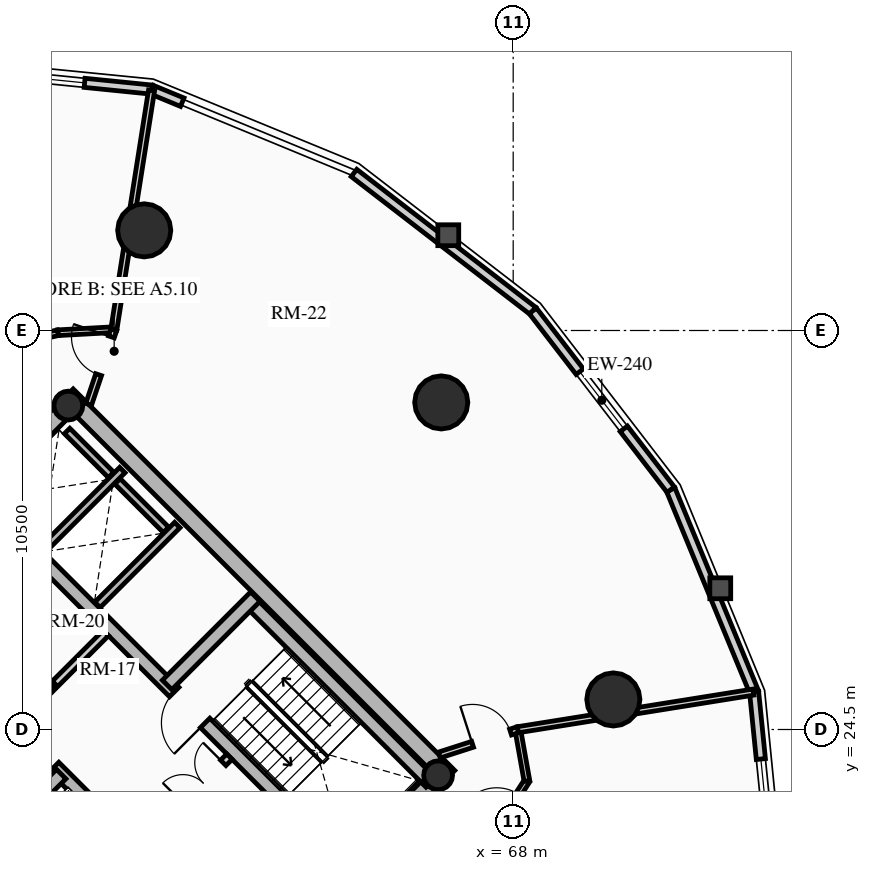
"""IFC4 building model, lengths in metres.
Left out: names, types, materials, properties, quantities, classifications, styles, units other than length and angle.
Written with IfcOpenShell. Run it as: python <this file> out.ifc"""

import sys

from ifc_helpers import new_model, si_unit, direction, frame, frame_2d, origin, origin_2d, place, context, subcontext, project, spatial, rectangle, circle, hollow_circle, extrude, source, transform, mapped, element, fill, save


model = new_model("IFC4")
c1 = context("Model", 3, precision=1e-05, world=origin(), true_north=direction((0.0, 1.0)))
c2 = subcontext(c1, "Body", "Model", "MODEL_VIEW")
j1 = project(units=[si_unit("LENGTHUNIT", "METRE"), si_unit("PLANEANGLEUNIT", "RADIAN")], contexts=[c1])
p1 = place(None, origin())
s1 = spatial("IfcSite", under=j1, at=p1, CompositionType="ELEMENT")
p2 = place(p1, origin())
s2 = spatial("IfcBuilding", under=s1, at=p2, CompositionType="ELEMENT")
p3 = place(p2, frame((0.0, 0.0, 132.88)))
s3 = spatial("IfcBuildingStorey", under=s2, at=p3, CompositionType="ELEMENT", Elevation=132.88)
for number, where, z_axis, x_axis in (
    (1, (58.737, 15.697, 0.0), (0.0, 0.0, 1.0), (-0.707, 0.707, 0.0)),
    (2, (66.303, 23.263, 0.0), (0.0, 0.0, 1.0), (-0.707, 0.707, 0.0)),
):
    element("IfcWall", number, at=place(p3, frame(where, z_axis=z_axis, x_axis=x_axis)), inside=s3, PredefinedType="SHEAR", context=c2, shape_type="SweptSolid", body=[
        extrude(rectangle(XDim=14.2, YDim=0.45, at=frame_2d((7.1, 0.0))), origin(), (0.0, 0.0, 1.0), 3.72),
    ])
p4 = place(p3, frame((58.578, 15.856, 0.0), z_axis=(0.0, 0.0, 1.0), x_axis=(0.707106781187, 0.707106781187, 0.0)))
e3 = element("IfcWall", 3, at=p4, inside=s3, PredefinedType="SHEAR", context=c2, shape_type="SweptSolid", body=[
    extrude(rectangle(XDim=10.7, YDim=0.45, at=frame_2d((5.35, 0.0))), origin(), (0.0, 0.0, 1.0), 3.72),
])
m1 = source(origin(), c2, "Body", "SweptSolid", [
    extrude(rectangle(XDim=1.5, YDim=2.02, at=frame_2d((0.75, 1.01))), frame((0.0, 0.235, 0.0), z_axis=(0.0, -1.0, 0.0), x_axis=(1.0, 0.0, 0.0)), (0.0, 0.0, 1.0), 0.47),
])
p5 = place(p4, frame((5.45, 0.0, 0.0)))
e4 = element("IfcOpeningElement", 4, at=p5, cuts=e3, PredefinedType="OPENING", context=c2, shape_type="MappedRepresentation", body=[
    mapped(m1, transform((0.0, 0.0, 0.0), x_axis=(1.0, 0.0, 0.0), y_axis=(0.0, 1.0, 0.0), z_axis=(0.0, 0.0, 1.0), scale=1.0)),
])
p6 = place(p3, frame((48.856, 25.578, 0.0), z_axis=(0.0, 0.0, 1.0), x_axis=(0.707106781187, 0.707106781187, 0.0)))
e5 = element("IfcWall", 5, at=p6, inside=s3, PredefinedType="SHEAR", context=c2, shape_type="SweptSolid", body=[
    extrude(rectangle(XDim=10.7, YDim=0.45, at=frame_2d((5.35, 0.0))), origin(), (0.0, 0.0, 1.0), 3.72),
])
p7 = place(p6, frame((4.6, 0.0, 0.0)))
e6 = element("IfcOpeningElement", 6, at=p7, cuts=e5, PredefinedType="OPENING", context=c2, shape_type="MappedRepresentation", body=[
    mapped(m1, transform((0.0, 0.0, 0.0), x_axis=(1.0, 0.0, 0.0), y_axis=(0.0, 1.0, 0.0), z_axis=(0.0, 0.0, 1.0), scale=1.0)),
])
p8 = place(p3, frame((61.078, 18.355, 0.0), z_axis=(0.0, 0.0, 1.0), x_axis=(-0.707106781187, 0.707106781187, 0.0)))
e7 = element("IfcWall", 7, at=p8, inside=s3, PredefinedType="SHEAR", context=c2, shape_type="SweptSolid", body=[
    extrude(rectangle(XDim=13.75, YDim=0.35, at=frame_2d((6.875, 0.0))), origin(), (0.0, 0.0, 1.0), 3.72),
])
m2 = source(origin(), c2, "Body", "SweptSolid", [
    extrude(rectangle(XDim=1.1, YDim=2.015, at=frame_2d((0.55, 1.007))), frame((0.0, 0.185, 0.0), z_axis=(0.0, -1.0, 0.0), x_axis=(1.0, 0.0, 0.0)), (0.0, 0.0, 1.0), 0.37),
])
p9 = place(p8, frame((4.875, 0.0, 0.0)))
e8 = element("IfcOpeningElement", 8, at=p9, cuts=e7, PredefinedType="OPENING", context=c2, shape_type="MappedRepresentation", body=[
    mapped(m2, transform((0.0, 0.0, 0.0), x_axis=(1.0, 0.0, 0.0), y_axis=(0.0, 1.0, 0.0), z_axis=(0.0, 0.0, 1.0), scale=1.0)),
])
p10 = place(p8, frame((0.65, 0.0, 0.0)))
e9 = element("IfcOpeningElement", 9, at=p10, cuts=e7, PredefinedType="OPENING", context=c2, shape_type="MappedRepresentation", body=[
    mapped(m2, transform((0.0, 0.0, 0.0), x_axis=(1.0, 0.0, 0.0), y_axis=(0.0, 1.0, 0.0), z_axis=(0.0, 0.0, 1.0), scale=1.0)),
])
p11 = place(p8, frame((2.65, 0.0, 0.0)))
e10 = element("IfcOpeningElement", 10, at=p11, cuts=e7, PredefinedType="OPENING", context=c2, shape_type="MappedRepresentation", body=[
    mapped(m2, transform((0.0, 0.0, 0.0), x_axis=(1.0, 0.0, 0.0), y_axis=(0.0, 1.0, 0.0), z_axis=(0.0, 0.0, 1.0), scale=1.0)),
])
m3 = source(origin(), c2, "Body", "SweptSolid", [
    extrude(rectangle(XDim=1.15, YDim=2.02, at=frame_2d((0.575, 1.01))), frame((0.0, 0.185, 0.0), z_axis=(0.0, -1.0, 0.0), x_axis=(1.0, 0.0, 0.0)), (0.0, 0.0, 1.0), 0.37),
])
p12 = place(p8, frame((7.295, 0.0, 0.0)))
e11 = element("IfcOpeningElement", 11, at=p12, cuts=e7, PredefinedType="OPENING", context=c2, shape_type="MappedRepresentation", body=[
    mapped(m3, transform((0.0, 0.0, 0.0), x_axis=(1.0, 0.0, 0.0), y_axis=(0.0, 1.0, 0.0), z_axis=(0.0, 0.0, 1.0), scale=1.0)),
])
p13 = place(p3, frame((63.645, 20.922, 0.0), z_axis=(0.0, 0.0, 1.0), x_axis=(-0.707106781187, 0.707106781187, 0.0)))
e12 = element("IfcWall", 12, at=p13, inside=s3, PredefinedType="SHEAR", context=c2, shape_type="SweptSolid", body=[
    extrude(rectangle(XDim=13.75, YDim=0.35, at=frame_2d((6.875, 0.0))), origin(), (0.0, 0.0, 1.0), 3.72),
])
p14 = place(p13, frame((5.305, 0.0, 0.0)))
e13 = element("IfcOpeningElement", 13, at=p14, cuts=e12, PredefinedType="OPENING", context=c2, shape_type="MappedRepresentation", body=[
    mapped(m3, transform((0.0, 0.0, 0.0), x_axis=(1.0, 0.0, 0.0), y_axis=(0.0, 1.0, 0.0), z_axis=(0.0, 0.0, 1.0), scale=1.0)),
])
p15 = place(p3, frame((53.784, 21.003, 0.0), z_axis=(0.0, 0.0, 1.0), x_axis=(0.707106781187, 0.707106781187, 0.0)))
e14 = element("IfcWall", 14, at=p15, inside=s3, PredefinedType="SHEAR", context=c2, shape_type="SweptSolid", body=[
    extrude(rectangle(XDim=3.285, YDim=0.35, at=frame_2d((1.643, 0.0))), origin(), (0.0, 0.0, 1.0), 3.72),
])
p16 = place(p3, frame((65.83, 23.107, 0.0), z_axis=(0.0, 0.0, 1.0), x_axis=(-0.707088616009, 0.707124945897, 0.0)))
e15 = element("IfcWall", 15, at=p16, inside=s3, PredefinedType="SHEAR", context=c2, shape_type="SweptSolid", body=[
    extrude(rectangle(XDim=6.72, YDim=0.35, at=frame_2d((3.36, 0.0))), origin(), (0.0, 0.0, 1.0), 3.72),
])
p17 = place(p3, frame((58.893, 25.674, 0.0), z_axis=(0.0, 0.0, 1.0), x_axis=(0.707106781187, 0.707106781187, 0.0)))
e16 = element("IfcWall", 16, at=p17, inside=s3, PredefinedType="SHEAR", context=c2, shape_type="SweptSolid", body=[
    extrude(rectangle(XDim=3.285, YDim=0.35, at=frame_2d((1.643, 0.0))), origin(), (0.0, 0.0, 1.0), 3.72),
])
for number, where, z_axis, x_axis in (
    (17, (66.024, 23.294, 0.0), (0.0, 0.0, 1.0), (0.707, 0.707, 0.0)),
    (18, (56.294, 33.024, 0.0), (0.0, 0.0, 1.0), (0.707, 0.707, 0.0)),
):
    element("IfcColumn", number, at=place(p3, frame(where, z_axis=z_axis, x_axis=x_axis)), inside=s3, PredefinedType="COLUMN", context=c2, shape_type="SweptSolid", body=[
        extrude(hollow_circle(Radius=0.38, WallThickness=0.032, at=origin_2d()), origin(), (0.0, 0.0, 1.0), 3.72),
    ])
for number, where, z_axis, x_axis in (
    (19, (66.107, 33.107, 0.0), (0.0, 0.0, 1.0), (1.0, 0.0, 0.0)),
    (20, (58.291, 37.635, 0.0), (0.0, 0.0, 1.0), (1.0, 0.0, 0.0)),
    (21, (70.635, 25.291, 0.0), (0.0, 0.0, 1.0), (1.0, 0.0, 0.0)),
):
    element("IfcColumn", number, at=place(p3, frame(where, z_axis=z_axis, x_axis=x_axis)), inside=s3, PredefinedType="USERDEFINED", context=c2, shape_type="SweptSolid", body=[
        extrude(circle(Radius=0.7, at=origin_2d()), origin(), (0.0, 0.0, 1.0), 3.72),
    ])
p18 = place(p3, frame((63.811, 39.145, 0.0), z_axis=(0.0, 0.0, 1.0), x_axis=(0.791982052206, -0.61054437102, 0.0)))
e22 = element("IfcWall", 22, at=p18, inside=s3, PredefinedType="SOLIDWALL", context=c2, shape_type="SweptSolid", body=[
    extrude(rectangle(XDim=5.942, YDim=0.24, at=frame_2d((2.971, 0.0))), origin(), (0.0, 0.0, 1.0), 2.949),
])
p19 = place(p3, frame((58.487, 41.339, 0.0), z_axis=(0.0, 0.0, 1.0), x_axis=(0.924556017656, -0.381046152345, 0.0)))
e23 = element("IfcWall", 23, at=p19, inside=s3, PredefinedType="SOLIDWALL", context=c2, shape_type="SweptSolid", body=[
    extrude(rectangle(XDim=0.87, YDim=0.24, at=frame_2d((0.435, 0.0))), origin(), (0.0, 0.0, 1.0), 2.949),
])
p20 = place(p3, frame((53.067, 41.885, 0.0), z_axis=(0.0, 0.0, 1.0), x_axis=(0.994971754311, -0.10015591906, 0.0)))
e24 = element("IfcWall", 24, at=p20, inside=s3, PredefinedType="SOLIDWALL", context=c2, shape_type="SweptSolid", body=[
    extrude(rectangle(XDim=5.448, YDim=0.24, at=frame_2d((2.724, 0.0))), origin(), (0.0, 0.0, 1.0), 2.949),
])
m4 = source(origin(), c2, "Body", "SweptSolid", [
    extrude(rectangle(XDim=1.9, YDim=1.35, at=frame_2d((0.95, 0.675))), frame((0.0, 0.13, 0.0), z_axis=(0.0, -1.0, 0.0), x_axis=(1.0, 0.0, 0.0)), (0.0, 0.0, 1.0), 0.26),
])
p21 = place(p20, frame((1.774, 0.0, 0.65)))
e25 = element("IfcOpeningElement", 25, at=p21, cuts=e24, PredefinedType="OPENING", context=c2, shape_type="MappedRepresentation", body=[
    mapped(m4, transform((0.0, 0.0, 0.0), x_axis=(1.0, 0.0, 0.0), y_axis=(0.0, 1.0, 0.0), z_axis=(0.0, 0.0, 1.0), scale=1.0)),
])
p22 = place(p3, frame((74.339, 25.487, 0.0), z_axis=(0.0, 0.0, 1.0), x_axis=(0.10015591906, -0.994971754311, 0.0)))
e26 = element("IfcWall", 26, at=p22, inside=s3, PredefinedType="SOLIDWALL", context=c2, shape_type="SweptSolid", body=[
    extrude(rectangle(XDim=5.448, YDim=0.24, at=frame_2d((2.724, 0.0))), origin(), (0.0, 0.0, 1.0), 2.949),
])
p23 = place(p22, frame((1.774, 0.0, 0.65)))
e27 = element("IfcOpeningElement", 27, at=p23, cuts=e26, PredefinedType="OPENING", context=c2, shape_type="MappedRepresentation", body=[
    mapped(m4, transform((0.0, 0.0, 0.0), x_axis=(1.0, 0.0, 0.0), y_axis=(0.0, 1.0, 0.0), z_axis=(0.0, 0.0, 1.0), scale=1.0)),
])
p24 = place(p3, frame((72.145, 30.811, 0.0), z_axis=(0.0, 0.0, 1.0), x_axis=(0.381027003055, -0.924563909604, 0.0)))
e28 = element("IfcWall", 28, at=p24, inside=s3, PredefinedType="SOLIDWALL", context=c2, shape_type="SweptSolid", body=[
    extrude(rectangle(XDim=5.758, YDim=0.24, at=frame_2d((2.879, 0.0))), origin(), (0.0, 0.0, 1.0), 2.949),
])
p25 = place(p3, frame((68.517, 35.517, 0.0), z_axis=(0.0, 0.0, 1.0), x_axis=(0.61054437102, -0.791982052206, 0.0)))
e29 = element("IfcWall", 29, at=p25, inside=s3, PredefinedType="SOLIDWALL", context=c2, shape_type="SweptSolid", body=[
    extrude(rectangle(XDim=5.942, YDim=0.24, at=frame_2d((2.971, 0.0))), origin(), (0.0, 0.0, 1.0), 2.949),
])
p26 = place(p25, frame((2.021, 0.0, 0.65)))
e30 = element("IfcOpeningElement", 30, at=p26, cuts=e29, PredefinedType="OPENING", context=c2, shape_type="MappedRepresentation", body=[
    mapped(m4, transform((0.0, 0.0, 0.0), x_axis=(1.0, 0.0, 0.0), y_axis=(0.0, 1.0, 0.0), z_axis=(0.0, 0.0, 1.0), scale=1.0)),
])
p27 = place(p3, frame((57.062, 27.781, 0.0), z_axis=(0.0, 0.0, 1.0), x_axis=(0.707106781187, 0.707106781187, 0.0)))
e31 = element("IfcWall", 31, at=p27, inside=s3, PredefinedType="SHEAR", context=c2, shape_type="SweptSolid", body=[
    extrude(rectangle(XDim=2.97, YDim=0.2, at=frame_2d((1.485, 0.0))), origin(), (0.0, 0.0, 1.0), 3.72),
])
p28 = place(p3, frame((55.615, 29.227, 0.0), z_axis=(0.0, 0.0, 1.0), x_axis=(0.707147878904, 0.70706568108, 0.0)))
e32 = element("IfcWall", 32, at=p28, inside=s3, PredefinedType="SHEAR", context=c2, shape_type="SweptSolid", body=[
    extrude(rectangle(XDim=2.97, YDim=0.2, at=frame_2d((1.485, 0.0))), origin(), (0.0, 0.0, 1.0), 3.72),
])
p29 = place(p3, frame((58.865, 29.754, 0.0), z_axis=(0.0, 0.0, 1.0), x_axis=(-0.707174411312, 0.707039144592, 0.0)))
e33 = element("IfcWall", 33, at=p29, inside=s3, PredefinedType="SHEAR", context=c2, shape_type="SweptSolid", body=[
    extrude(rectangle(XDim=1.805, YDim=0.2, at=frame_2d((0.902, 0.0))), origin(), (0.0, 0.0, 1.0), 3.72),
])
p30 = place(p3, frame((57.419, 31.2, 0.0), z_axis=(0.0, 0.0, 1.0), x_axis=(-0.707032117043, 0.707181437447, 0.0)))
e34 = element("IfcWall", 34, at=p30, inside=s3, PredefinedType="SHEAR", context=c2, shape_type="SweptSolid", body=[
    extrude(rectangle(XDim=1.635, YDim=0.2, at=frame_2d((0.817, 0.0))), origin(), (0.0, 0.0, 1.0), 3.72),
])
p31 = place(p3, frame((58.214, 21.467, 0.0), z_axis=(0.0, 0.0, 1.0), x_axis=(0.707106781187, 0.707106781187, 0.0)))
e35 = element("IfcWall", 35, at=p31, inside=s3, PredefinedType="PARTITIONING", context=c2, shape_type="SweptSolid", body=[
    extrude(rectangle(XDim=3.28, YDim=0.2, at=frame_2d((1.64, 0.0))), origin(), (0.0, 0.0, 1.0), 3.425),
])
m5 = source(origin(), c2, "Body", "SweptSolid", [
    extrude(rectangle(XDim=1.5, YDim=2.02, at=frame_2d((0.75, 1.01))), frame((0.0, 0.11, 0.0), z_axis=(0.0, -1.0, 0.0), x_axis=(1.0, 0.0, 0.0)), (0.0, 0.0, 1.0), 0.22),
])
p32 = place(p31, frame((1.55, 0.0, 0.0)))
e36 = element("IfcOpeningElement", 36, at=p32, cuts=e35, PredefinedType="OPENING", context=c2, shape_type="MappedRepresentation", body=[
    mapped(m5, transform((0.0, 0.0, 0.0), x_axis=(1.0, 0.0, 0.0), y_axis=(0.0, 1.0, 0.0), z_axis=(0.0, 0.0, 1.0), scale=1.0)),
])
p33 = place(p3, frame((54.961, 24.719, 0.0), z_axis=(0.0, 0.0, 1.0), x_axis=(0.707106781187, 0.707106781187, 0.0)))
e37 = element("IfcWall", 37, at=p33, inside=s3, PredefinedType="PARTITIONING", context=c2, shape_type="SweptSolid", body=[
    extrude(rectangle(XDim=3.28, YDim=0.2, at=frame_2d((1.64, 0.0))), origin(), (0.0, 0.0, 1.0), 3.425),
])
m6 = source(origin(), c2, "Body", "SweptSolid", [
    extrude(rectangle(XDim=0.9, YDim=2.005, at=frame_2d((0.45, 1.002))), frame((0.0, 0.11, 0.0), z_axis=(0.0, -1.0, 0.0), x_axis=(1.0, 0.0, 0.0)), (0.0, 0.0, 1.0), 0.22),
])
p34 = place(p33, frame((0.16, 0.0, 0.0)))
e38 = element("IfcOpeningElement", 38, at=p34, cuts=e37, PredefinedType="OPENING", context=c2, shape_type="MappedRepresentation", body=[
    mapped(m6, transform((0.0, 0.0, 0.0), x_axis=(1.0, 0.0, 0.0), y_axis=(0.0, 1.0, 0.0), z_axis=(0.0, 0.0, 1.0), scale=1.0)),
])
p35 = place(p3, frame((55.874, 25.631, 0.0), z_axis=(0.0, 0.0, 1.0), x_axis=(-0.707157639372, 0.707055919343, 0.0)))
e39 = element("IfcWall", 39, at=p35, inside=s3, PredefinedType="PARTITIONING", context=c2, shape_type="SweptSolid", body=[
    extrude(rectangle(XDim=2.4, YDim=0.2, at=frame_2d((1.2, 0.0))), origin(), (0.0, 0.0, 1.0), 3.425),
])
p36 = place(p3, frame((57.491, 35.021, 0.0), z_axis=(0.0, 0.0, 1.0), x_axis=(-0.9985194771, -0.054395347698, 0.0)))
e40 = element("IfcWall", 40, at=p36, inside=s3, PredefinedType="PARTITIONING", context=c2, shape_type="SweptSolid", body=[
    extrude(rectangle(XDim=1.472, YDim=0.15, at=frame_2d((0.736, 0.0))), origin(), (0.0, 0.0, 1.0), 2.995),
])
p37 = place(p3, frame((56.021, 34.941, 0.0), z_axis=(0.0, 0.0, 1.0), x_axis=(-0.975309543901, -0.220842236847, 0.0)))
e41 = element("IfcWall", 41, at=p37, inside=s3, PredefinedType="PARTITIONING", context=c2, shape_type="SweptSolid", body=[
    extrude(rectangle(XDim=1.585, YDim=0.15, at=frame_2d((0.792, 0.0))), origin(), (0.0, 0.0, 1.0), 2.995),
])
p38 = place(p3, frame((67.343, 21.569, 0.0), z_axis=(0.0, 0.0, 1.0), x_axis=(0.542722446786, 0.83991210597, 0.0)))
e42 = element("IfcWall", 42, at=p38, inside=s3, PredefinedType="PARTITIONING", context=c2, shape_type="SweptSolid", body=[
    extrude(rectangle(XDim=1.876, YDim=0.15, at=frame_2d((0.938, 0.0))), origin(), (0.0, 0.0, 1.0), 2.995),
])
m7 = source(origin(), c2, "Body", "SweptSolid", [
    extrude(rectangle(XDim=1.05, YDim=2.015, at=frame_2d((0.525, 1.007))), frame((0.0, 0.085, 0.0), z_axis=(0.0, -1.0, 0.0), x_axis=(1.0, 0.0, 0.0)), (0.0, 0.0, 1.0), 0.17),
])
p39 = place(p38, frame((0.413, 0.0, 0.0)))
e43 = element("IfcOpeningElement", 43, at=p39, cuts=e42, PredefinedType="OPENING", context=c2, shape_type="MappedRepresentation", body=[
    mapped(m7, transform((0.0, 0.0, 0.0), x_axis=(1.0, 0.0, 0.0), y_axis=(0.0, 1.0, 0.0), z_axis=(0.0, 0.0, 1.0), scale=1.0)),
])
p40 = place(p3, frame((68.362, 23.145, 0.0), z_axis=(0.0, 0.0, 1.0), x_axis=(-0.175605524171, 0.984460613677, 0.0)))
e44 = element("IfcWall", 44, at=p40, inside=s3, PredefinedType="PARTITIONING", context=c2, shape_type="SweptSolid", body=[
    extrude(rectangle(XDim=1.369, YDim=0.15, at=frame_2d((0.685, 0.0))), origin(), (0.0, 0.0, 1.0), 2.995),
])
p41 = place(p3, frame((57.491, 35.021, 0.0), z_axis=(0.0, 0.0, 1.0), x_axis=(0.155805268746, 0.98778779008, 0.0)))
e45 = element("IfcWall", 45, at=p41, inside=s3, PredefinedType="PARTITIONING", context=c2, shape_type="SweptSolid", body=[
    extrude(rectangle(XDim=6.376, YDim=0.16, at=frame_2d((3.188, 0.0))), origin(), (0.0, 0.0, 1.0), 2.949),
])
p42 = place(p3, frame((68.121, 24.493, 0.0), z_axis=(0.0, 0.0, 1.0), x_axis=(0.987466345552, 0.15782970697, 0.0)))
e46 = element("IfcWall", 46, at=p42, inside=s3, PredefinedType="PARTITIONING", context=c2, shape_type="SweptSolid", body=[
    extrude(rectangle(XDim=6.277, YDim=0.16, at=frame_2d((3.139, 0.0))), origin(), (0.0, 0.0, 1.0), 2.949),
])
p43 = place(p3, frame((56.828, 33.056, 0.0), z_axis=(0.0, 0.0, 1.0), x_axis=(0.319439175969, 0.94760678177, 0.0)))
e47 = element("IfcWall", 47, at=p43, inside=s3, PredefinedType="PARTITIONING", context=c2, shape_type="SweptSolid", body=[
    extrude(rectangle(XDim=2.074, YDim=0.16, at=frame_2d((1.037, 0.0))), origin(), (0.0, 0.0, 1.0), 2.995),
])
m8 = source(origin(), c2, "Body", "SweptSolid", [
    extrude(rectangle(XDim=1.05, YDim=2.015, at=frame_2d((0.525, 1.007))), frame((0.0, 0.09, 0.0), z_axis=(0.0, -1.0, 0.0), x_axis=(1.0, 0.0, 0.0)), (0.0, 0.0, 1.0), 0.18),
])
p44 = place(p43, frame((0.824, 0.0, 0.0)))
e48 = element("IfcOpeningElement", 48, at=p44, cuts=e47, PredefinedType="OPENING", context=c2, shape_type="MappedRepresentation", body=[
    mapped(m8, transform((0.0, 0.0, 0.0), x_axis=(1.0, 0.0, 0.0), y_axis=(0.0, 1.0, 0.0), z_axis=(0.0, 0.0, 1.0), scale=1.0)),
])
p45 = place(p3, frame((66.056, 23.828, 0.0), z_axis=(0.0, 0.0, 1.0), x_axis=(0.951830504244, 0.306624674792, 0.0)))
e49 = element("IfcWall", 49, at=p45, inside=s3, PredefinedType="PARTITIONING", context=c2, shape_type="SweptSolid", body=[
    extrude(rectangle(XDim=2.17, YDim=0.16, at=frame_2d((1.085, 0.0))), origin(), (0.0, 0.0, 1.0), 2.995),
])
p46 = place(p45, frame((0.92, 0.0, 0.0)))
e50 = element("IfcOpeningElement", 50, at=p46, cuts=e49, PredefinedType="OPENING", context=c2, shape_type="MappedRepresentation", body=[
    mapped(m8, transform((0.0, 0.0, 0.0), x_axis=(1.0, 0.0, 0.0), y_axis=(0.0, 1.0, 0.0), z_axis=(0.0, 0.0, 1.0), scale=1.0)),
])
m9 = source(origin(), c2, "Body", "SweptSolid", [
    extrude(rectangle(XDim=1.9, YDim=1.35, at=frame_2d((0.95, 0.675))), frame((0.0, 0.03, 0.0), z_axis=(0.0, -1.0, 0.0), x_axis=(1.0, 0.0, 0.0)), (0.0, 0.0, 1.0), 0.06),
])
p47 = place(p21, origin())
e51 = element("IfcWindow", 51, at=p47, inside=s3, PartitioningType="DOUBLE_PANEL_VERTICAL", PredefinedType="WINDOW", context=c2, shape_type="MappedRepresentation", body=[
    mapped(m9, transform((0.0, 0.0, 0.0), x_axis=(1.0, 0.0, 0.0), y_axis=(0.0, 1.0, 0.0), z_axis=(0.0, 0.0, 1.0), scale=1.0)),
])
fill(e25, e51)
p48 = place(p23, origin())
e52 = element("IfcWindow", 52, at=p48, inside=s3, PartitioningType="DOUBLE_PANEL_VERTICAL", PredefinedType="WINDOW", context=c2, shape_type="MappedRepresentation", body=[
    mapped(m9, transform((0.0, 0.0, 0.0), x_axis=(1.0, 0.0, 0.0), y_axis=(0.0, 1.0, 0.0), z_axis=(0.0, 0.0, 1.0), scale=1.0)),
])
fill(e27, e52)
p49 = place(p26, origin())
e53 = element("IfcWindow", 53, at=p49, inside=s3, PartitioningType="DOUBLE_PANEL_VERTICAL", PredefinedType="WINDOW", context=c2, shape_type="MappedRepresentation", body=[
    mapped(m9, transform((0.0, 0.0, 0.0), x_axis=(1.0, 0.0, 0.0), y_axis=(0.0, 1.0, 0.0), z_axis=(0.0, 0.0, 1.0), scale=1.0)),
])
fill(e30, e53)
m10 = source(origin(), c2, "Body", "SweptSolid", [
    extrude(rectangle(XDim=1.15, YDim=2.02, at=frame_2d((0.575, 1.01))), frame((0.0, 0.025, 0.0), z_axis=(0.0, -1.0, 0.0), x_axis=(1.0, 0.0, 0.0)), (0.0, 0.0, 1.0), 0.05),
])
p50 = place(p12, origin())
e54 = element("IfcDoor", 54, at=p50, inside=s3, OperationType="SINGLE_SWING_RIGHT", PredefinedType="DOOR", context=c2, shape_type="MappedRepresentation", body=[
    mapped(m10, transform((0.0, 0.0, 0.0), x_axis=(1.0, 0.0, 0.0), y_axis=(0.0, 1.0, 0.0), z_axis=(0.0, 0.0, 1.0), scale=1.0)),
])
fill(e11, e54)
p51 = place(p14, origin())
e55 = element("IfcDoor", 55, at=p51, inside=s3, OperationType="SINGLE_SWING_LEFT", PredefinedType="DOOR", context=c2, shape_type="MappedRepresentation", body=[
    mapped(m10, transform((0.0, 0.0, 0.0), x_axis=(1.0, 0.0, 0.0), y_axis=(0.0, 1.0, 0.0), z_axis=(0.0, 0.0, 1.0), scale=1.0)),
])
fill(e13, e55)
m11 = source(origin(), c2, "Body", "SweptSolid", [
    extrude(rectangle(XDim=1.5, YDim=2.02, at=frame_2d((0.75, 1.01))), frame((0.0, 0.025, 0.0), z_axis=(0.0, -1.0, 0.0), x_axis=(1.0, 0.0, 0.0)), (0.0, 0.0, 1.0), 0.05),
])
p52 = place(p32, origin())
e56 = element("IfcDoor", 56, at=p52, inside=s3, OperationType="DOUBLE_DOOR_SINGLE_SWING", PredefinedType="DOOR", context=c2, shape_type="MappedRepresentation", body=[
    mapped(m11, transform((0.0, 0.0, 0.0), x_axis=(1.0, 0.0, 0.0), y_axis=(0.0, 1.0, 0.0), z_axis=(0.0, 0.0, 1.0), scale=1.0)),
])
fill(e36, e56)
m12 = source(origin(), c2, "Body", "SweptSolid", [
    extrude(rectangle(XDim=1.05, YDim=2.015, at=frame_2d((0.525, 1.007))), frame((0.0, 0.025, 0.0), z_axis=(0.0, -1.0, 0.0), x_axis=(1.0, 0.0, 0.0)), (0.0, 0.0, 1.0), 0.05),
])
p53 = place(p44, origin())
e57 = element("IfcDoor", 57, at=p53, inside=s3, OperationType="SINGLE_SWING_RIGHT", PredefinedType="DOOR", context=c2, shape_type="MappedRepresentation", body=[
    mapped(m12, transform((0.0, 0.0, 0.0), x_axis=(1.0, 0.0, 0.0), y_axis=(0.0, 1.0, 0.0), z_axis=(0.0, 0.0, 1.0), scale=1.0)),
])
fill(e48, e57)
p54 = place(p46, origin())
e58 = element("IfcDoor", 58, at=p54, inside=s3, OperationType="SINGLE_SWING_LEFT", PredefinedType="DOOR", context=c2, shape_type="MappedRepresentation", body=[
    mapped(m12, transform((0.0, 0.0, 0.0), x_axis=(1.0, 0.0, 0.0), y_axis=(0.0, 1.0, 0.0), z_axis=(0.0, 0.0, 1.0), scale=1.0)),
])
fill(e50, e58)
save(model, sys.argv[1])
